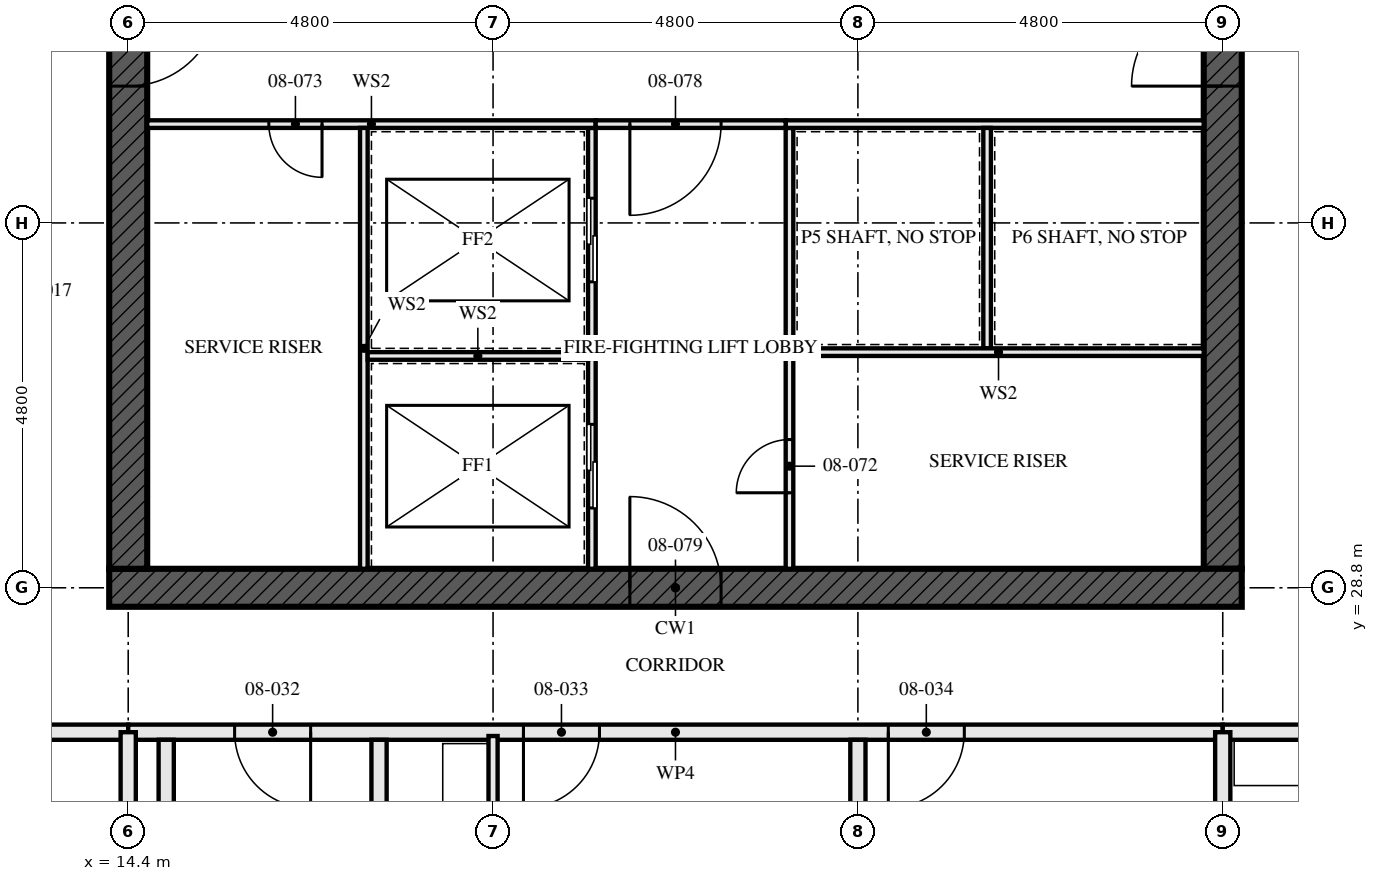
"""IFC4 building model, lengths in metres.
Left out: names, types, materials, properties, quantities, classifications, styles, units other than length and angle.
Written with IfcOpenShell. Run it as: python <this file> out.ifc"""

import sys

from ifc_helpers import new_model, si_unit, direction, frame, frame_2d, origin, place, context, subcontext, project, spatial, rectangle, extrude, element, fill, save


model = new_model("IFC4")
c1 = context("Model", 3, precision=1e-05, world=origin(), true_north=direction((0.0, 1.0)))
c2 = subcontext(c1, "Body", "Model", "MODEL_VIEW")
j1 = project(units=[si_unit("LENGTHUNIT", "METRE"), si_unit("PLANEANGLEUNIT", "RADIAN")], contexts=[c1])
p1 = place(None, origin())
s1 = spatial("IfcSite", under=j1, at=p1, CompositionType="ELEMENT")
p2 = place(p1, origin())
s2 = spatial("IfcBuilding", under=s1, at=p2, CompositionType="ELEMENT")
p3 = place(p2, frame((0.0, 0.0, 34.0)))
s3 = spatial("IfcBuildingStorey", under=s2, at=p3, CompositionType="ELEMENT", Elevation=34.0)
p4 = place(p3, frame((14.15, 28.8, -0.17), z_axis=(0.0, 0.0, 1.0), x_axis=(1.0, 0.0, 0.0)))
e1 = element("IfcWall", 1, at=p4, inside=s3, PredefinedType="SHEAR", context=c2, shape_type="SweptSolid", body=[
    extrude(rectangle(XDim=14.9, YDim=0.5, at=frame_2d((7.45, 0.0))), origin(), (0.0, 0.0, 1.0), 3.5),
])
p5 = place(p4, frame((6.85, 0.0, 0.17)))
e2 = element("IfcOpeningElement", 2, at=p5, cuts=e1, PredefinedType="OPENING", context=c2, shape_type="SweptSolid", body=[
    extrude(rectangle(XDim=1.2, YDim=2.1, at=frame_2d((0.6, 1.05))), frame((0.0, 0.26, 0.0), z_axis=(0.0, -1.0, 0.0), x_axis=(1.0, 0.0, 0.0)), (0.0, 0.0, 1.0), 0.521),
])
p6 = place(p3, frame((14.4, 42.95, -0.17), z_axis=(0.0, 0.0, 1.0), x_axis=(0.0, -1.0, 0.0)))
e3 = element("IfcWall", 3, at=p6, inside=s3, PredefinedType="SHEAR", context=c2, shape_type="SweptSolid", body=[
    extrude(rectangle(XDim=13.9, YDim=0.5, at=frame_2d((6.95, 0.0))), origin(), (0.0, 0.0, 1.0), 3.5),
])
p7 = place(p6, frame((6.35, 0.0, 0.17)))
e4 = element("IfcOpeningElement", 4, at=p7, cuts=e3, PredefinedType="OPENING", context=c2, shape_type="SweptSolid", body=[
    extrude(rectangle(XDim=1.2, YDim=2.1, at=frame_2d((0.6, 1.05))), frame((0.0, 0.26, 0.0), z_axis=(0.0, -1.0, 0.0), x_axis=(1.0, 0.0, 0.0)), (0.0, 0.0, 1.0), 0.521),
])
p8 = place(p3, frame((28.8, 29.05, -0.17), z_axis=(0.0, 0.0, 1.0), x_axis=(0.0, 1.0, 0.0)))
e5 = element("IfcWall", 5, at=p8, inside=s3, PredefinedType="SHEAR", context=c2, shape_type="SweptSolid", body=[
    extrude(rectangle(XDim=13.9, YDim=0.5, at=frame_2d((6.95, 0.0))), origin(), (0.0, 0.0, 1.0), 3.5),
])
p9 = place(p8, frame((6.35, 0.0, 0.17)))
e6 = element("IfcOpeningElement", 6, at=p9, cuts=e5, PredefinedType="OPENING", context=c2, shape_type="SweptSolid", body=[
    extrude(rectangle(XDim=1.2, YDim=2.1, at=frame_2d((0.6, 1.05))), frame((0.0, 0.26, 0.0), z_axis=(0.0, -1.0, 0.0), x_axis=(1.0, 0.0, 0.0)), (0.0, 0.0, 1.0), 0.521),
])
p10 = place(p3, frame((4.8, 26.9, 0.0), z_axis=(0.0, 0.0, 1.0), x_axis=(1.0, 0.0, 0.0)))
e7 = element("IfcWall", 7, at=p10, inside=s3, PredefinedType="PARTITIONING", context=c2, shape_type="SweptSolid", body=[
    extrude(rectangle(XDim=9.6, YDim=0.2, at=frame_2d((4.8, 0.0))), origin(), (0.0, 0.0, 1.0), 3.33),
])
p11 = place(p10, frame((0.4, 0.0, 0.0)))
e8 = element("IfcOpeningElement", 8, at=p11, cuts=e7, PredefinedType="OPENING", context=c2, shape_type="SweptSolid", body=[
    extrude(rectangle(XDim=1.0, YDim=2.1, at=frame_2d((0.5, 1.05))), frame((0.0, 0.111, 0.0), z_axis=(0.0, -1.0, 0.0), x_axis=(1.0, 0.0, 0.0)), (0.0, 0.0, 1.0), 0.221),
])
p12 = place(p10, frame((5.2, 0.0, 0.0)))
e9 = element("IfcOpeningElement", 9, at=p12, cuts=e7, PredefinedType="OPENING", context=c2, shape_type="SweptSolid", body=[
    extrude(rectangle(XDim=1.0, YDim=2.1, at=frame_2d((0.5, 1.05))), frame((0.0, 0.111, 0.0), z_axis=(0.0, -1.0, 0.0), x_axis=(1.0, 0.0, 0.0)), (0.0, 0.0, 1.0), 0.221),
])
for number, where, z_axis, x_axis in (
    (10, (14.9, 22.1, 0.0), (0.0, 0.0, 1.0), (0.0, 1.0, 0.0)),
    (11, (17.7, 22.1, 0.0), (0.0, 0.0, 1.0), (0.0, 1.0, 0.0)),
):
    element("IfcWall", number, at=place(p3, frame(where, z_axis=z_axis, x_axis=x_axis)), inside=s3, PredefinedType="SOLIDWALL", context=c2, shape_type="SweptSolid", body=[
        extrude(rectangle(XDim=4.7, YDim=0.2, at=frame_2d((2.35, 0.0))), origin(), (0.0, 0.0, 1.0), 2.99),
    ])
p13 = place(p3, frame((19.2, 20.6, 0.0), z_axis=(0.0, 0.0, 1.0), x_axis=(0.0, 1.0, 0.0)))
e12 = element("IfcWall", 12, at=p13, inside=s3, PredefinedType="PARTITIONING", context=c2, shape_type="SweptSolid", body=[
    extrude(rectangle(XDim=6.25, YDim=0.12, at=frame_2d((3.125, 0.0))), origin(), (0.0, 0.0, 1.0), 2.55),
])
p14 = place(p13, frame((2.675, 0.0, 0.0)))
e13 = element("IfcOpeningElement", 13, at=p14, cuts=e12, PredefinedType="OPENING", context=c2, shape_type="SweptSolid", body=[
    extrude(rectangle(XDim=0.9, YDim=2.1, at=frame_2d((0.45, 1.05))), frame((0.0, 0.071, 0.0), z_axis=(0.0, -1.0, 0.0), x_axis=(1.0, 0.0, 0.0)), (0.0, 0.0, 1.0), 0.141),
])
p15 = place(p3, frame((24.0, 14.795, 0.0), z_axis=(0.0, 0.0, 1.0), x_axis=(0.0, 1.0, 0.0)))
e14 = element("IfcWall", 14, at=p15, inside=s3, PredefinedType="PARTITIONING", context=c2, shape_type="SweptSolid", body=[
    extrude(rectangle(XDim=12.005, YDim=0.2, at=frame_2d((6.002, 0.0))), origin(), (0.0, 0.0, 1.0), 2.55),
])
p16 = place(p3, frame((14.4, 26.9, 0.0), z_axis=(0.0, 0.0, 1.0), x_axis=(1.0, 0.0, 0.0)))
e15 = element("IfcWall", 15, at=p16, inside=s3, PredefinedType="PARTITIONING", context=c2, shape_type="SweptSolid", body=[
    extrude(rectangle(XDim=14.4, YDim=0.2, at=frame_2d((7.2, 0.0))), origin(), (0.0, 0.0, 1.0), 2.55),
])
p17 = place(p16, frame((1.4, 0.0, 0.0)))
e16 = element("IfcOpeningElement", 16, at=p17, cuts=e15, PredefinedType="OPENING", context=c2, shape_type="SweptSolid", body=[
    extrude(rectangle(XDim=1.0, YDim=2.1, at=frame_2d((0.5, 1.05))), frame((0.0, 0.111, 0.0), z_axis=(0.0, -1.0, 0.0), x_axis=(1.0, 0.0, 0.0)), (0.0, 0.0, 1.0), 0.221),
])
p18 = place(p16, frame((5.2, 0.0, 0.0)))
e17 = element("IfcOpeningElement", 17, at=p18, cuts=e15, PredefinedType="OPENING", context=c2, shape_type="SweptSolid", body=[
    extrude(rectangle(XDim=1.0, YDim=2.1, at=frame_2d((0.5, 1.05))), frame((0.0, 0.111, 0.0), z_axis=(0.0, -1.0, 0.0), x_axis=(1.0, 0.0, 0.0)), (0.0, 0.0, 1.0), 0.221),
])
p19 = place(p16, frame((10.0, 0.0, 0.0)))
e18 = element("IfcOpeningElement", 18, at=p19, cuts=e15, PredefinedType="OPENING", context=c2, shape_type="SweptSolid", body=[
    extrude(rectangle(XDim=1.0, YDim=2.1, at=frame_2d((0.5, 1.05))), frame((0.0, 0.111, 0.0), z_axis=(0.0, -1.0, 0.0), x_axis=(1.0, 0.0, 0.0)), (0.0, 0.0, 1.0), 0.221),
])
p20 = place(p3, frame((28.8, 26.9, 0.0), z_axis=(0.0, 0.0, 1.0), x_axis=(1.0, 0.0, 0.0)))
e19 = element("IfcWall", 19, at=p20, inside=s3, PredefinedType="PARTITIONING", context=c2, shape_type="SweptSolid", body=[
    extrude(rectangle(XDim=9.6, YDim=0.2, at=frame_2d((4.8, 0.0))), origin(), (0.0, 0.0, 1.0), 3.33),
])
p21 = place(p20, frame((5.2, 0.0, 0.0)))
e20 = element("IfcOpeningElement", 20, at=p21, cuts=e19, PredefinedType="OPENING", context=c2, shape_type="SweptSolid", body=[
    extrude(rectangle(XDim=1.0, YDim=2.1, at=frame_2d((0.5, 1.05))), frame((0.0, 0.111, 0.0), z_axis=(0.0, -1.0, 0.0), x_axis=(1.0, 0.0, 0.0)), (0.0, 0.0, 1.0), 0.221),
])
p22 = place(p3, frame((20.5, 29.05, 0.0), z_axis=(0.0, 0.0, 1.0), x_axis=(0.0, 1.0, 0.0)))
e21 = element("IfcWall", 21, at=p22, inside=s3, PredefinedType="SOLIDWALL", context=c2, shape_type="SweptSolid", body=[
    extrude(rectangle(XDim=5.8, YDim=0.1, at=frame_2d((2.9, 0.0))), origin(), (0.0, 0.0, 1.0), 3.33),
])
p23 = place(p22, frame((0.8, 0.0, 0.0)))
e22 = element("IfcOpeningElement", 22, at=p23, cuts=e21, PredefinedType="OPENING", context=c2, shape_type="SweptSolid", body=[
    extrude(rectangle(XDim=1.1, YDim=2.3, at=frame_2d((0.55, 1.15))), frame((0.0, 0.061, 0.0), z_axis=(0.0, -1.0, 0.0), x_axis=(1.0, 0.0, 0.0)), (0.0, 0.0, 1.0), 0.121),
])
p24 = place(p22, frame((3.775, 0.0, 0.0)))
e23 = element("IfcOpeningElement", 23, at=p24, cuts=e21, PredefinedType="OPENING", context=c2, shape_type="SweptSolid", body=[
    extrude(rectangle(XDim=1.1, YDim=2.3, at=frame_2d((0.55, 1.15))), frame((0.0, 0.061, 0.0), z_axis=(0.0, -1.0, 0.0), x_axis=(1.0, 0.0, 0.0)), (0.0, 0.0, 1.0), 0.121),
])
p25 = place(p3, frame((23.1, 29.05, 0.0), z_axis=(0.0, 0.0, 1.0), x_axis=(0.0, 1.0, 0.0)))
e24 = element("IfcWall", 24, at=p25, inside=s3, PredefinedType="SOLIDWALL", context=c2, shape_type="SweptSolid", body=[
    extrude(rectangle(XDim=5.8, YDim=0.1, at=frame_2d((2.9, 0.0))), origin(), (0.0, 0.0, 1.0), 3.33),
])
p26 = place(p25, frame((1.0, 0.0, 0.0)))
e25 = element("IfcOpeningElement", 25, at=p26, cuts=e24, PredefinedType="OPENING", context=c2, shape_type="SweptSolid", body=[
    extrude(rectangle(XDim=0.7, YDim=2.1, at=frame_2d((0.35, 1.05))), frame((0.0, 0.061, 0.0), z_axis=(0.0, -1.0, 0.0), x_axis=(1.0, 0.0, 0.0)), (0.0, 0.0, 1.0), 0.121),
])
p27 = place(p3, frame((14.65, 34.9, 0.0), z_axis=(0.0, 0.0, 1.0), x_axis=(1.0, 0.0, 0.0)))
e26 = element("IfcWall", 26, at=p27, inside=s3, PredefinedType="SOLIDWALL", context=c2, shape_type="SweptSolid", body=[
    extrude(rectangle(XDim=5.9, YDim=0.1, at=frame_2d((2.95, 0.0))), origin(), (0.0, 0.0, 1.0), 3.33),
])
p28 = place(p27, frame((1.6, 0.0, 0.0)))
e27 = element("IfcOpeningElement", 27, at=p28, cuts=e26, PredefinedType="OPENING", context=c2, shape_type="SweptSolid", body=[
    extrude(rectangle(XDim=0.7, YDim=2.1, at=frame_2d((0.35, 1.05))), frame((0.0, 0.061, 0.0), z_axis=(0.0, -1.0, 0.0), x_axis=(1.0, 0.0, 0.0)), (0.0, 0.0, 1.0), 0.121),
])
p29 = place(p3, frame((23.05, 34.9, 0.0), z_axis=(0.0, 0.0, 1.0), x_axis=(1.0, 0.0, 0.0)))
e28 = element("IfcWall", 28, at=p29, inside=s3, PredefinedType="SOLIDWALL", context=c2, shape_type="SweptSolid", body=[
    extrude(rectangle(XDim=5.5, YDim=0.1, at=frame_2d((2.75, 0.0))), origin(), (0.0, 0.0, 1.0), 3.33),
])
p30 = place(p3, frame((20.55, 34.9, 0.0), z_axis=(0.0, 0.0, 1.0), x_axis=(1.0, 0.0, 0.0)))
e29 = element("IfcWall", 29, at=p30, inside=s3, PredefinedType="SOLIDWALL", context=c2, shape_type="SweptSolid", body=[
    extrude(rectangle(XDim=2.5, YDim=0.1, at=frame_2d((1.25, 0.0))), origin(), (0.0, 0.0, 1.0), 3.33),
])
p31 = place(p30, frame((0.45, 0.0, 0.0)))
e30 = element("IfcOpeningElement", 30, at=p31, cuts=e29, PredefinedType="OPENING", context=c2, shape_type="SweptSolid", body=[
    extrude(rectangle(XDim=1.2, YDim=2.1, at=frame_2d((0.6, 1.05))), frame((0.0, 0.061, 0.0), z_axis=(0.0, -1.0, 0.0), x_axis=(1.0, 0.0, 0.0)), (0.0, 0.0, 1.0), 0.121),
])
p32 = place(p3, frame((17.5, 29.05, 0.0), z_axis=(0.0, 0.0, 1.0), x_axis=(0.0, 1.0, 0.0)))
e31 = element("IfcWall", 31, at=p32, inside=s3, PredefinedType="SOLIDWALL", context=c2, shape_type="SweptSolid", body=[
    extrude(rectangle(XDim=5.8, YDim=0.1, at=frame_2d((2.9, 0.0))), origin(), (0.0, 0.0, 1.0), 3.33),
])
p33 = place(p3, frame((17.55, 31.85, 0.0), z_axis=(0.0, 0.0, 1.0), x_axis=(1.0, 0.0, 0.0)))
e32 = element("IfcWall", 32, at=p33, inside=s3, PredefinedType="SOLIDWALL", context=c2, shape_type="SweptSolid", body=[
    extrude(rectangle(XDim=2.9, YDim=0.1, at=frame_2d((1.45, 0.0))), origin(), (0.0, 0.0, 1.0), 3.33),
])
p34 = place(p3, frame((25.7, 31.95, 0.0), z_axis=(0.0, 0.0, 1.0), x_axis=(0.0, 1.0, 0.0)))
e33 = element("IfcWall", 33, at=p34, inside=s3, PredefinedType="SOLIDWALL", context=c2, shape_type="SweptSolid", body=[
    extrude(rectangle(XDim=2.9, YDim=0.1, at=frame_2d((1.45, 0.0))), origin(), (0.0, 0.0, 1.0), 3.33),
])
p35 = place(p3, frame((23.15, 31.9, 0.0), z_axis=(0.0, 0.0, 1.0), x_axis=(1.0, 0.0, 0.0)))
e34 = element("IfcWall", 34, at=p35, inside=s3, PredefinedType="SOLIDWALL", context=c2, shape_type="SweptSolid", body=[
    extrude(rectangle(XDim=5.4, YDim=0.1, at=frame_2d((2.7, 0.0))), origin(), (0.0, 0.0, 1.0), 3.33),
])
for number, where, z_axis, x_axis in (
    (35, (14.4, 24.395, 0.0), (0.0, 0.0, 1.0), (0.0, 1.0, 0.0)),
    (36, (28.8, 24.395, 0.0), (0.0, 0.0, 1.0), (0.0, 1.0, 0.0)),
):
    element("IfcWall", number, at=place(p3, frame(where, z_axis=z_axis, x_axis=x_axis)), inside=s3, PredefinedType="PARTITIONING", context=c2, shape_type="SweptSolid", body=[
        extrude(rectangle(XDim=2.505, YDim=0.2, at=frame_2d((1.252, 0.0))), origin(), (0.0, 0.0, 1.0), 2.32),
    ])
p36 = place(p17, frame((1.0, 0.0, 0.0), z_axis=(0.0, 0.0, 1.0), x_axis=(-1.0, 0.0, 0.0)))
e37 = element("IfcDoor", 37, at=p36, inside=s3, OperationType="SINGLE_SWING_RIGHT", PredefinedType="DOOR", context=c2, shape_type="SweptSolid", body=[
    extrude(rectangle(XDim=1.0, YDim=2.1, at=frame_2d((0.5, 1.05))), frame((0.0, 0.032, 0.0), z_axis=(0.0, -1.0, 0.0), x_axis=(1.0, 0.0, 0.0)), (0.0, 0.0, 1.0), 0.064),
])
fill(e16, e37)
p37 = place(p18, frame((1.0, 0.0, 0.0), z_axis=(0.0, 0.0, 1.0), x_axis=(-1.0, 0.0, 0.0)))
e38 = element("IfcDoor", 38, at=p37, inside=s3, OperationType="SINGLE_SWING_LEFT", PredefinedType="DOOR", context=c2, shape_type="SweptSolid", body=[
    extrude(rectangle(XDim=1.0, YDim=2.1, at=frame_2d((0.5, 1.05))), frame((0.0, 0.027, 0.0), z_axis=(0.0, -1.0, 0.0), x_axis=(1.0, 0.0, 0.0)), (0.0, 0.0, 1.0), 0.054),
])
fill(e17, e38)
p38 = place(p19, frame((1.0, 0.0, 0.0), z_axis=(0.0, 0.0, 1.0), x_axis=(-1.0, 0.0, 0.0)))
e39 = element("IfcDoor", 39, at=p38, inside=s3, OperationType="SINGLE_SWING_LEFT", PredefinedType="DOOR", context=c2, shape_type="SweptSolid", body=[
    extrude(rectangle(XDim=1.0, YDim=2.1, at=frame_2d((0.5, 1.05))), frame((0.0, 0.027, 0.0), z_axis=(0.0, -1.0, 0.0), x_axis=(1.0, 0.0, 0.0)), (0.0, 0.0, 1.0), 0.054),
])
fill(e18, e39)
p39 = place(p23, origin())
e40 = element("IfcDoor", 40, at=p39, inside=s3, OperationType="SLIDING_TO_LEFT", PredefinedType="DOOR", context=c2, shape_type="SweptSolid", body=[
    extrude(rectangle(XDim=1.1, YDim=2.3, at=frame_2d((0.55, 1.15))), frame((0.0, 0.05, 0.0), z_axis=(0.0, -1.0, 0.0), x_axis=(1.0, 0.0, 0.0)), (0.0, 0.0, 1.0), 0.1),
])
fill(e22, e40)
p40 = place(p24, origin())
e41 = element("IfcDoor", 41, at=p40, inside=s3, OperationType="SLIDING_TO_LEFT", PredefinedType="DOOR", context=c2, shape_type="SweptSolid", body=[
    extrude(rectangle(XDim=1.1, YDim=2.3, at=frame_2d((0.55, 1.15))), frame((0.0, 0.05, 0.0), z_axis=(0.0, -1.0, 0.0), x_axis=(1.0, 0.0, 0.0)), (0.0, 0.0, 1.0), 0.1),
])
fill(e23, e41)
p41 = place(p26, origin())
e42 = element("IfcDoor", 42, at=p41, inside=s3, OperationType="SINGLE_SWING_RIGHT", PredefinedType="DOOR", context=c2, shape_type="SweptSolid", body=[
    extrude(rectangle(XDim=0.7, YDim=2.1, at=frame_2d((0.35, 1.05))), frame((0.0, 0.027, 0.0), z_axis=(0.0, -1.0, 0.0), x_axis=(1.0, 0.0, 0.0)), (0.0, 0.0, 1.0), 0.054),
])
fill(e25, e42)
p42 = place(p28, frame((0.7, 0.0, 0.0), z_axis=(0.0, 0.0, 1.0), x_axis=(-1.0, 0.0, 0.0)))
e43 = element("IfcDoor", 43, at=p42, inside=s3, OperationType="SINGLE_SWING_RIGHT", PredefinedType="DOOR", context=c2, shape_type="SweptSolid", body=[
    extrude(rectangle(XDim=0.7, YDim=2.1, at=frame_2d((0.35, 1.05))), frame((0.0, 0.027, 0.0), z_axis=(0.0, -1.0, 0.0), x_axis=(1.0, 0.0, 0.0)), (0.0, 0.0, 1.0), 0.054),
])
fill(e27, e43)
p43 = place(p31, frame((1.2, 0.0, 0.0), z_axis=(0.0, 0.0, 1.0), x_axis=(-1.0, 0.0, 0.0)))
e44 = element("IfcDoor", 44, at=p43, inside=s3, OperationType="SINGLE_SWING_LEFT", PredefinedType="DOOR", context=c2, shape_type="SweptSolid", body=[
    extrude(rectangle(XDim=1.2, YDim=2.1, at=frame_2d((0.6, 1.05))), frame((0.0, 0.027, 0.0), z_axis=(0.0, -1.0, 0.0), x_axis=(1.0, 0.0, 0.0)), (0.0, 0.0, 1.0), 0.054),
])
fill(e30, e44)
p44 = place(p5, origin())
e45 = element("IfcDoor", 45, at=p44, inside=s3, OperationType="SINGLE_SWING_LEFT", PredefinedType="DOOR", context=c2, shape_type="SweptSolid", body=[
    extrude(rectangle(XDim=1.2, YDim=2.1, at=frame_2d((0.6, 1.05))), frame((0.0, 0.027, 0.0), z_axis=(0.0, -1.0, 0.0), x_axis=(1.0, 0.0, 0.0)), (0.0, 0.0, 1.0), 0.054),
])
fill(e2, e45)
p45 = place(p7, origin())
e46 = element("IfcDoor", 46, at=p45, inside=s3, OperationType="SINGLE_SWING_LEFT", PredefinedType="DOOR", context=c2, shape_type="SweptSolid", body=[
    extrude(rectangle(XDim=1.2, YDim=2.1, at=frame_2d((0.6, 1.05))), frame((0.0, 0.027, 0.0), z_axis=(0.0, -1.0, 0.0), x_axis=(1.0, 0.0, 0.0)), (0.0, 0.0, 1.0), 0.054),
])
fill(e4, e46)
p46 = place(p9, origin())
e47 = element("IfcDoor", 47, at=p46, inside=s3, OperationType="SINGLE_SWING_LEFT", PredefinedType="DOOR", context=c2, shape_type="SweptSolid", body=[
    extrude(rectangle(XDim=1.2, YDim=2.1, at=frame_2d((0.6, 1.05))), frame((0.0, 0.027, 0.0), z_axis=(0.0, -1.0, 0.0), x_axis=(1.0, 0.0, 0.0)), (0.0, 0.0, 1.0), 0.054),
])
fill(e6, e47)
save(model, sys.argv[1])
